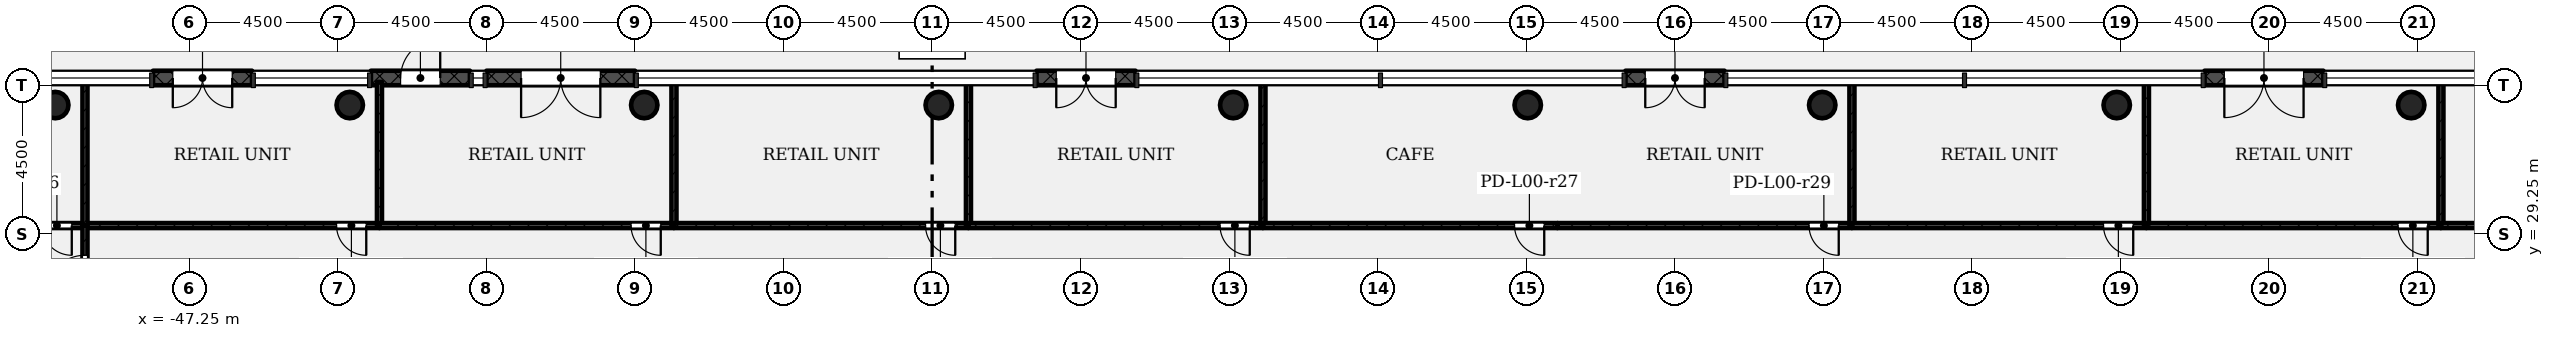
"""IFC4 building model, lengths in metres.
Left out: names, types, materials, properties, quantities, classifications, styles, units other than length and angle.
Written with IfcOpenShell. Run it as: python <this file> out.ifc"""

import sys

from ifc_helpers import new_model, si_unit, direction, frame, frame_2d, origin, origin_2d, place, context, subcontext, project, spatial, rectangle, hollow_circle, extrude, element, fill, save


model = new_model("IFC4")
c1 = context("Model", 3, precision=1e-05, world=origin(), true_north=direction((0.0, 1.0)))
c2 = subcontext(c1, "Body", "Model", "MODEL_VIEW")
j1 = project(units=[si_unit("LENGTHUNIT", "METRE"), si_unit("PLANEANGLEUNIT", "RADIAN")], contexts=[c1])
p1 = place(None, origin())
s1 = spatial("IfcSite", under=j1, at=p1, CompositionType="ELEMENT")
p2 = place(p1, origin())
s2 = spatial("IfcBuilding", under=s1, at=p2, CompositionType="ELEMENT")
p3 = place(p2, origin())
s3 = spatial("IfcBuildingStorey", under=s2, at=p3, CompositionType="ELEMENT", Elevation=0.0)
for number, where, z_axis, x_axis in (
    (1, (-51.31, 33.15, -0.4), (0.0, 0.0, 1.0), (1.0, 0.0, 0.0)),
    (2, (-42.39, 33.15, -0.4), (0.0, 0.0, 1.0), (1.0, 0.0, 0.0)),
    (3, (-33.47, 33.15, -0.4), (0.0, 0.0, 1.0), (1.0, 0.0, 0.0)),
    (4, (-24.55, 33.15, -0.4), (0.0, 0.0, 1.0), (1.0, 0.0, 0.0)),
    (5, (-15.63, 33.15, -0.4), (0.0, 0.0, 1.0), (1.0, 0.0, 0.0)),
    (6, (-6.71, 33.15, -0.4), (0.0, 0.0, 1.0), (1.0, 0.0, 0.0)),
    (7, (2.21, 33.15, -0.4), (0.0, 0.0, 1.0), (1.0, 0.0, 0.0)),
    (8, (11.13, 33.15, -0.4), (0.0, 0.0, 1.0), (1.0, 0.0, 0.0)),
    (9, (20.05, 33.15, -0.4), (0.0, 0.0, 1.0), (1.0, 0.0, 0.0)),
):
    element("IfcColumn", number, at=place(p3, frame(where, z_axis=z_axis, x_axis=x_axis)), inside=s3, PredefinedType="COLUMN", context=c2, shape_type="SweptSolid", body=[
        extrude(hollow_circle(Radius=0.4, WallThickness=0.028, at=origin_2d()), origin(), (0.0, 0.0, 1.0), 6.4),
    ])
p4 = place(p3, frame((17.39, 33.97, 0.0), z_axis=(0.0, 0.0, 1.0), x_axis=(-1.0, 0.0, 0.0)))
e10 = element("IfcWall", 10, at=p4, inside=s3, PredefinedType="STANDARD", context=c2, shape_type="SweptSolid", body=[
    extrude(rectangle(XDim=3.6, YDim=0.44, at=frame_2d((1.8, 0.0))), origin(), (0.0, 0.0, 1.0), 5.7),
])
p5 = place(p4, frame((0.6, 0.0, 0.0)))
e11 = element("IfcOpeningElement", 11, at=p5, cuts=e10, PredefinedType="OPENING", context=c2, shape_type="SweptSolid", body=[
    extrude(rectangle(XDim=2.4, YDim=2.4, at=frame_2d((1.2, 1.2))), frame((0.0, 0.23, 0.0), z_axis=(0.0, -1.0, 0.0), x_axis=(1.0, 0.0, 0.0)), (0.0, 0.0, 1.0), 0.46),
])
p6 = place(p3, frame((-0.75, 33.97, 0.0), z_axis=(0.0, 0.0, 1.0), x_axis=(-1.0, 0.0, 0.0)))
e12 = element("IfcWall", 12, at=p6, inside=s3, PredefinedType="STANDARD", context=c2, shape_type="SweptSolid", body=[
    extrude(rectangle(XDim=3.0, YDim=0.44, at=frame_2d((1.5, 0.0))), origin(), (0.0, 0.0, 1.0), 5.7),
])
p7 = place(p6, frame((0.6, 0.0, 0.0)))
e13 = element("IfcOpeningElement", 13, at=p7, cuts=e12, PredefinedType="OPENING", context=c2, shape_type="SweptSolid", body=[
    extrude(rectangle(XDim=1.8, YDim=2.1, at=frame_2d((0.9, 1.05))), frame((0.0, 0.23, 0.0), z_axis=(0.0, -1.0, 0.0), x_axis=(1.0, 0.0, 0.0)), (0.0, 0.0, 1.0), 0.46),
])
p8 = place(p3, frame((-18.59, 33.97, 0.0), z_axis=(0.0, 0.0, 1.0), x_axis=(-1.0, 0.0, 0.0)))
e14 = element("IfcWall", 14, at=p8, inside=s3, PredefinedType="STANDARD", context=c2, shape_type="SweptSolid", body=[
    extrude(rectangle(XDim=3.0, YDim=0.44, at=frame_2d((1.5, 0.0))), origin(), (0.0, 0.0, 1.0), 5.7),
])
p9 = place(p8, frame((0.6, 0.0, 0.0)))
e15 = element("IfcOpeningElement", 15, at=p9, cuts=e14, PredefinedType="OPENING", context=c2, shape_type="SweptSolid", body=[
    extrude(rectangle(XDim=1.8, YDim=2.1, at=frame_2d((0.9, 1.05))), frame((0.0, 0.23, 0.0), z_axis=(0.0, -1.0, 0.0), x_axis=(1.0, 0.0, 0.0)), (0.0, 0.0, 1.0), 0.46),
])
p10 = place(p3, frame((-33.75, 33.97, 0.0), z_axis=(0.0, 0.0, 1.0), x_axis=(-1.0, 0.0, 0.0)))
e16 = element("IfcWall", 16, at=p10, inside=s3, PredefinedType="STANDARD", context=c2, shape_type="SweptSolid", body=[
    extrude(rectangle(XDim=4.5, YDim=0.44, at=frame_2d((2.25, 0.0))), origin(), (0.0, 0.0, 1.0), 5.7),
])
p11 = place(p10, frame((1.05, 0.0, 0.0)))
e17 = element("IfcOpeningElement", 17, at=p11, cuts=e16, PredefinedType="OPENING", context=c2, shape_type="SweptSolid", body=[
    extrude(rectangle(XDim=2.4, YDim=2.1, at=frame_2d((1.2, 1.05))), frame((0.0, 0.23, 0.0), z_axis=(0.0, -1.0, 0.0), x_axis=(1.0, 0.0, 0.0)), (0.0, 0.0, 1.0), 0.46),
])
p12 = place(p3, frame((-38.75, 33.97, 0.0), z_axis=(0.0, 0.0, 1.0), x_axis=(-1.0, 0.0, 0.0)))
e18 = element("IfcWall", 18, at=p12, inside=s3, PredefinedType="STANDARD", context=c2, shape_type="SweptSolid", body=[
    extrude(rectangle(XDim=3.0, YDim=0.44, at=frame_2d((1.5, 0.0))), origin(), (0.0, 0.0, 1.0), 5.7),
])
p13 = place(p12, frame((0.9, 0.0, 0.0)))
e19 = element("IfcOpeningElement", 19, at=p13, cuts=e18, PredefinedType="OPENING", context=c2, shape_type="SweptSolid", body=[
    extrude(rectangle(XDim=1.2, YDim=2.1, at=frame_2d((0.6, 1.05))), frame((0.0, 0.23, 0.0), z_axis=(0.0, -1.0, 0.0), x_axis=(1.0, 0.0, 0.0)), (0.0, 0.0, 1.0), 0.46),
])
p14 = place(p3, frame((-45.35, 33.97, 0.0), z_axis=(0.0, 0.0, 1.0), x_axis=(-1.0, 0.0, 0.0)))
e20 = element("IfcWall", 20, at=p14, inside=s3, PredefinedType="STANDARD", context=c2, shape_type="SweptSolid", body=[
    extrude(rectangle(XDim=3.0, YDim=0.44, at=frame_2d((1.5, 0.0))), origin(), (0.0, 0.0, 1.0), 5.7),
])
p15 = place(p14, frame((0.6, 0.0, 0.0)))
e21 = element("IfcOpeningElement", 21, at=p15, cuts=e20, PredefinedType="OPENING", context=c2, shape_type="SweptSolid", body=[
    extrude(rectangle(XDim=1.8, YDim=2.1, at=frame_2d((0.9, 1.05))), frame((0.0, 0.23, 0.0), z_axis=(0.0, -1.0, 0.0), x_axis=(1.0, 0.0, 0.0)), (0.0, 0.0, 1.0), 0.46),
])
p16 = place(p3, frame((-50.41, 29.5, 0.0), z_axis=(0.0, 0.0, 1.0), x_axis=(-1.0, 0.0, 0.0)))
e22 = element("IfcWall", 22, at=p16, inside=s3, PredefinedType="PARTITIONING", context=c2, shape_type="SweptSolid", body=[
    extrude(rectangle(XDim=8.92, YDim=0.15, at=frame_2d((4.46, 0.0))), origin(), (0.0, 0.0, 1.0), 5.58),
])
p17 = place(p16, frame((0.4, 0.0, 0.0)))
e23 = element("IfcOpeningElement", 23, at=p17, cuts=e22, PredefinedType="OPENING", context=c2, shape_type="SweptSolid", body=[
    extrude(rectangle(XDim=0.9, YDim=2.1, at=frame_2d((0.45, 1.05))), frame((0.0, 0.085, 0.0), z_axis=(0.0, -1.0, 0.0), x_axis=(1.0, 0.0, 0.0)), (0.0, 0.0, 1.0), 0.17),
])
p18 = place(p3, frame((-41.49, 29.5, 0.0), z_axis=(0.0, 0.0, 1.0), x_axis=(-1.0, 0.0, 0.0)))
e24 = element("IfcWall", 24, at=p18, inside=s3, PredefinedType="PARTITIONING", context=c2, shape_type="SweptSolid", body=[
    extrude(rectangle(XDim=8.92, YDim=0.15, at=frame_2d((4.46, 0.0))), origin(), (0.0, 0.0, 1.0), 5.58),
])
p19 = place(p18, frame((0.4, 0.0, 0.0)))
e25 = element("IfcOpeningElement", 25, at=p19, cuts=e24, PredefinedType="OPENING", context=c2, shape_type="SweptSolid", body=[
    extrude(rectangle(XDim=0.9, YDim=2.1, at=frame_2d((0.45, 1.05))), frame((0.0, 0.085, 0.0), z_axis=(0.0, -1.0, 0.0), x_axis=(1.0, 0.0, 0.0)), (0.0, 0.0, 1.0), 0.17),
])
for number, where, z_axis, x_axis in (
    (26, (-50.41, 29.5, 0.0), (0.0, 0.0, 1.0), (0.0, 1.0, 0.0)),
    (27, (-41.49, 33.85, 0.0), (0.0, 0.0, 1.0), (0.0, -1.0, 0.0)),
):
    element("IfcWall", number, at=place(p3, frame(where, z_axis=z_axis, x_axis=x_axis)), inside=s3, PredefinedType="PARTITIONING", context=c2, shape_type="SweptSolid", body=[
        extrude(rectangle(XDim=4.35, YDim=0.15, at=frame_2d((2.175, 0.0))), origin(), (0.0, 0.0, 1.0), 5.58),
    ])
p20 = place(p3, frame((-32.57, 29.5, 0.0), z_axis=(0.0, 0.0, 1.0), x_axis=(-1.0, 0.0, 0.0)))
e28 = element("IfcWall", 28, at=p20, inside=s3, PredefinedType="PARTITIONING", context=c2, shape_type="SweptSolid", body=[
    extrude(rectangle(XDim=8.92, YDim=0.15, at=frame_2d((4.46, 0.0))), origin(), (0.0, 0.0, 1.0), 5.58),
])
p21 = place(p20, frame((0.4, 0.0, 0.0)))
e29 = element("IfcOpeningElement", 29, at=p21, cuts=e28, PredefinedType="OPENING", context=c2, shape_type="SweptSolid", body=[
    extrude(rectangle(XDim=0.9, YDim=2.1, at=frame_2d((0.45, 1.05))), frame((0.0, 0.085, 0.0), z_axis=(0.0, -1.0, 0.0), x_axis=(1.0, 0.0, 0.0)), (0.0, 0.0, 1.0), 0.17),
])
p22 = place(p3, frame((-32.57, 33.85, 0.0), z_axis=(0.0, 0.0, 1.0), x_axis=(0.0, -1.0, 0.0)))
e30 = element("IfcWall", 30, at=p22, inside=s3, PredefinedType="PARTITIONING", context=c2, shape_type="SweptSolid", body=[
    extrude(rectangle(XDim=4.35, YDim=0.15, at=frame_2d((2.175, 0.0))), origin(), (0.0, 0.0, 1.0), 5.58),
])
p23 = place(p3, frame((-23.65, 29.5, 0.0), z_axis=(0.0, 0.0, 1.0), x_axis=(-1.0, 0.0, 0.0)))
e31 = element("IfcWall", 31, at=p23, inside=s3, PredefinedType="PARTITIONING", context=c2, shape_type="SweptSolid", body=[
    extrude(rectangle(XDim=8.92, YDim=0.15, at=frame_2d((4.46, 0.0))), origin(), (0.0, 0.0, 1.0), 5.58),
])
p24 = place(p23, frame((0.4, 0.0, 0.0)))
e32 = element("IfcOpeningElement", 32, at=p24, cuts=e31, PredefinedType="OPENING", context=c2, shape_type="SweptSolid", body=[
    extrude(rectangle(XDim=0.9, YDim=2.1, at=frame_2d((0.45, 1.05))), frame((0.0, 0.085, 0.0), z_axis=(0.0, -1.0, 0.0), x_axis=(1.0, 0.0, 0.0)), (0.0, 0.0, 1.0), 0.17),
])
p25 = place(p3, frame((-23.65, 33.85, 0.0), z_axis=(0.0, 0.0, 1.0), x_axis=(0.0, -1.0, 0.0)))
e33 = element("IfcWall", 33, at=p25, inside=s3, PredefinedType="PARTITIONING", context=c2, shape_type="SweptSolid", body=[
    extrude(rectangle(XDim=4.35, YDim=0.15, at=frame_2d((2.175, 0.0))), origin(), (0.0, 0.0, 1.0), 5.58),
])
p26 = place(p3, frame((-14.73, 29.5, 0.0), z_axis=(0.0, 0.0, 1.0), x_axis=(-1.0, 0.0, 0.0)))
e34 = element("IfcWall", 34, at=p26, inside=s3, PredefinedType="PARTITIONING", context=c2, shape_type="SweptSolid", body=[
    extrude(rectangle(XDim=8.92, YDim=0.15, at=frame_2d((4.46, 0.0))), origin(), (0.0, 0.0, 1.0), 5.58),
])
p27 = place(p26, frame((0.4, 0.0, 0.0)))
e35 = element("IfcOpeningElement", 35, at=p27, cuts=e34, PredefinedType="OPENING", context=c2, shape_type="SweptSolid", body=[
    extrude(rectangle(XDim=0.9, YDim=2.1, at=frame_2d((0.45, 1.05))), frame((0.0, 0.085, 0.0), z_axis=(0.0, -1.0, 0.0), x_axis=(1.0, 0.0, 0.0)), (0.0, 0.0, 1.0), 0.17),
])
p28 = place(p3, frame((-14.73, 33.85, 0.0), z_axis=(0.0, 0.0, 1.0), x_axis=(0.0, -1.0, 0.0)))
e36 = element("IfcWall", 36, at=p28, inside=s3, PredefinedType="PARTITIONING", context=c2, shape_type="SweptSolid", body=[
    extrude(rectangle(XDim=4.35, YDim=0.15, at=frame_2d((2.175, 0.0))), origin(), (0.0, 0.0, 1.0), 5.58),
])
p29 = place(p3, frame((-5.81, 29.5, 0.0), z_axis=(0.0, 0.0, 1.0), x_axis=(-1.0, 0.0, 0.0)))
e37 = element("IfcWall", 37, at=p29, inside=s3, PredefinedType="PARTITIONING", context=c2, shape_type="SweptSolid", body=[
    extrude(rectangle(XDim=8.92, YDim=0.15, at=frame_2d((4.46, 0.0))), origin(), (0.0, 0.0, 1.0), 5.58),
])
p30 = place(p29, frame((0.4, 0.0, 0.0)))
e38 = element("IfcOpeningElement", 38, at=p30, cuts=e37, PredefinedType="OPENING", context=c2, shape_type="SweptSolid", body=[
    extrude(rectangle(XDim=0.9, YDim=2.1, at=frame_2d((0.45, 1.05))), frame((0.0, 0.085, 0.0), z_axis=(0.0, -1.0, 0.0), x_axis=(1.0, 0.0, 0.0)), (0.0, 0.0, 1.0), 0.17),
])
p31 = place(p3, frame((-50.41, 26.5, 0.0), z_axis=(0.0, 0.0, 1.0), x_axis=(0.0, 1.0, 0.0)))
e39 = element("IfcWall", 39, at=p31, inside=s3, PredefinedType="PARTITIONING", context=c2, shape_type="SweptSolid", body=[
    extrude(rectangle(XDim=3.0, YDim=0.15, at=frame_2d((1.5, 0.0))), origin(), (0.0, 0.0, 1.0), 5.58),
])
p32 = place(p31, frame((0.9, 0.0, 0.0)))
e40 = element("IfcOpeningElement", 40, at=p32, cuts=e39, PredefinedType="OPENING", context=c2, shape_type="SweptSolid", body=[
    extrude(rectangle(XDim=1.2, YDim=2.1, at=frame_2d((0.6, 1.05))), frame((0.0, 0.085, 0.0), z_axis=(0.0, -1.0, 0.0), x_axis=(1.0, 0.0, 0.0)), (0.0, 0.0, 1.0), 0.17),
])
p33 = place(p3, frame((3.11, 29.5, 0.0), z_axis=(0.0, 0.0, 1.0), x_axis=(-1.0, 0.0, 0.0)))
e41 = element("IfcWall", 41, at=p33, inside=s3, PredefinedType="PARTITIONING", context=c2, shape_type="SweptSolid", body=[
    extrude(rectangle(XDim=8.92, YDim=0.15, at=frame_2d((4.46, 0.0))), origin(), (0.0, 0.0, 1.0), 5.58),
])
p34 = place(p33, frame((0.4, 0.0, 0.0)))
e42 = element("IfcOpeningElement", 42, at=p34, cuts=e41, PredefinedType="OPENING", context=c2, shape_type="SweptSolid", body=[
    extrude(rectangle(XDim=0.9, YDim=2.1, at=frame_2d((0.45, 1.05))), frame((0.0, 0.085, 0.0), z_axis=(0.0, -1.0, 0.0), x_axis=(1.0, 0.0, 0.0)), (0.0, 0.0, 1.0), 0.17),
])
p35 = place(p3, frame((3.11, 33.85, 0.0), z_axis=(0.0, 0.0, 1.0), x_axis=(0.0, -1.0, 0.0)))
e43 = element("IfcWall", 43, at=p35, inside=s3, PredefinedType="PARTITIONING", context=c2, shape_type="SweptSolid", body=[
    extrude(rectangle(XDim=4.35, YDim=0.15, at=frame_2d((2.175, 0.0))), origin(), (0.0, 0.0, 1.0), 5.58),
])
p36 = place(p3, frame((12.03, 29.5, 0.0), z_axis=(0.0, 0.0, 1.0), x_axis=(-1.0, 0.0, 0.0)))
e44 = element("IfcWall", 44, at=p36, inside=s3, PredefinedType="PARTITIONING", context=c2, shape_type="SweptSolid", body=[
    extrude(rectangle(XDim=8.92, YDim=0.15, at=frame_2d((4.46, 0.0))), origin(), (0.0, 0.0, 1.0), 5.58),
])
p37 = place(p36, frame((0.4, 0.0, 0.0)))
e45 = element("IfcOpeningElement", 45, at=p37, cuts=e44, PredefinedType="OPENING", context=c2, shape_type="SweptSolid", body=[
    extrude(rectangle(XDim=0.9, YDim=2.1, at=frame_2d((0.45, 1.05))), frame((0.0, 0.085, 0.0), z_axis=(0.0, -1.0, 0.0), x_axis=(1.0, 0.0, 0.0)), (0.0, 0.0, 1.0), 0.17),
])
p38 = place(p3, frame((12.03, 33.85, 0.0), z_axis=(0.0, 0.0, 1.0), x_axis=(0.0, -1.0, 0.0)))
e46 = element("IfcWall", 46, at=p38, inside=s3, PredefinedType="PARTITIONING", context=c2, shape_type="SweptSolid", body=[
    extrude(rectangle(XDim=4.35, YDim=0.15, at=frame_2d((2.175, 0.0))), origin(), (0.0, 0.0, 1.0), 5.58),
])
p39 = place(p3, frame((20.95, 29.5, 0.0), z_axis=(0.0, 0.0, 1.0), x_axis=(-1.0, 0.0, 0.0)))
e47 = element("IfcWall", 47, at=p39, inside=s3, PredefinedType="PARTITIONING", context=c2, shape_type="SweptSolid", body=[
    extrude(rectangle(XDim=8.92, YDim=0.15, at=frame_2d((4.46, 0.0))), origin(), (0.0, 0.0, 1.0), 5.58),
])
p40 = place(p39, frame((0.4, 0.0, 0.0)))
e48 = element("IfcOpeningElement", 48, at=p40, cuts=e47, PredefinedType="OPENING", context=c2, shape_type="SweptSolid", body=[
    extrude(rectangle(XDim=0.9, YDim=2.1, at=frame_2d((0.45, 1.05))), frame((0.0, 0.085, 0.0), z_axis=(0.0, -1.0, 0.0), x_axis=(1.0, 0.0, 0.0)), (0.0, 0.0, 1.0), 0.17),
])
p41 = place(p3, frame((20.95, 33.85, 0.0), z_axis=(0.0, 0.0, 1.0), x_axis=(0.0, -1.0, 0.0)))
e49 = element("IfcWall", 49, at=p41, inside=s3, PredefinedType="PARTITIONING", context=c2, shape_type="SweptSolid", body=[
    extrude(rectangle(XDim=4.35, YDim=0.15, at=frame_2d((2.175, 0.0))), origin(), (0.0, 0.0, 1.0), 5.58),
])
p42 = place(p3, frame((29.87, 29.5, 0.0), z_axis=(0.0, 0.0, 1.0), x_axis=(-1.0, 0.0, 0.0)))
e50 = element("IfcWall", 50, at=p42, inside=s3, PredefinedType="PARTITIONING", context=c2, shape_type="SweptSolid", body=[
    extrude(rectangle(XDim=8.92, YDim=0.15, at=frame_2d((4.46, 0.0))), origin(), (0.0, 0.0, 1.0), 5.58),
])
p43 = place(p42, frame((0.4, 0.0, 0.0)))
e51 = element("IfcOpeningElement", 51, at=p43, cuts=e50, PredefinedType="OPENING", context=c2, shape_type="SweptSolid", body=[
    extrude(rectangle(XDim=0.9, YDim=2.1, at=frame_2d((0.45, 1.05))), frame((0.0, 0.085, 0.0), z_axis=(0.0, -1.0, 0.0), x_axis=(1.0, 0.0, 0.0)), (0.0, 0.0, 1.0), 0.17),
])
p44 = place(p5, origin())
e52 = element("IfcDoor", 52, at=p44, inside=s3, OperationType="DOUBLE_DOOR_DOUBLE_SWING", PredefinedType="DOOR", context=c2, shape_type="SweptSolid", body=[
    extrude(rectangle(XDim=2.4, YDim=2.4, at=frame_2d((1.2, 1.2))), frame((0.0, 0.025, 0.0), z_axis=(0.0, -1.0, 0.0), x_axis=(1.0, 0.0, 0.0)), (0.0, 0.0, 1.0), 0.05),
])
fill(e11, e52)
p45 = place(p7, origin())
e53 = element("IfcDoor", 53, at=p45, inside=s3, OperationType="DOUBLE_DOOR_DOUBLE_SWING", PredefinedType="DOOR", context=c2, shape_type="SweptSolid", body=[
    extrude(rectangle(XDim=1.8, YDim=2.1, at=frame_2d((0.9, 1.05))), frame((0.0, 0.025, 0.0), z_axis=(0.0, -1.0, 0.0), x_axis=(1.0, 0.0, 0.0)), (0.0, 0.0, 1.0), 0.05),
])
fill(e13, e53)
p46 = place(p9, origin())
e54 = element("IfcDoor", 54, at=p46, inside=s3, OperationType="DOUBLE_DOOR_DOUBLE_SWING", PredefinedType="DOOR", context=c2, shape_type="SweptSolid", body=[
    extrude(rectangle(XDim=1.8, YDim=2.1, at=frame_2d((0.9, 1.05))), frame((0.0, 0.025, 0.0), z_axis=(0.0, -1.0, 0.0), x_axis=(1.0, 0.0, 0.0)), (0.0, 0.0, 1.0), 0.05),
])
fill(e15, e54)
p47 = place(p11, origin())
e55 = element("IfcDoor", 55, at=p47, inside=s3, OperationType="DOUBLE_DOOR_DOUBLE_SWING", PredefinedType="DOOR", context=c2, shape_type="SweptSolid", body=[
    extrude(rectangle(XDim=2.4, YDim=2.1, at=frame_2d((1.2, 1.05))), frame((0.0, 0.025, 0.0), z_axis=(0.0, -1.0, 0.0), x_axis=(1.0, 0.0, 0.0)), (0.0, 0.0, 1.0), 0.05),
])
fill(e17, e55)
p48 = place(p13, origin())
e56 = element("IfcDoor", 56, at=p48, inside=s3, OperationType="SINGLE_SWING_LEFT", PredefinedType="DOOR", context=c2, shape_type="SweptSolid", body=[
    extrude(rectangle(XDim=1.2, YDim=2.1, at=frame_2d((0.6, 1.05))), frame((0.0, 0.025, 0.0), z_axis=(0.0, -1.0, 0.0), x_axis=(1.0, 0.0, 0.0)), (0.0, 0.0, 1.0), 0.05),
])
fill(e19, e56)
p49 = place(p15, origin())
e57 = element("IfcDoor", 57, at=p49, inside=s3, OperationType="DOUBLE_DOOR_DOUBLE_SWING", PredefinedType="DOOR", context=c2, shape_type="SweptSolid", body=[
    extrude(rectangle(XDim=1.8, YDim=2.1, at=frame_2d((0.9, 1.05))), frame((0.0, 0.025, 0.0), z_axis=(0.0, -1.0, 0.0), x_axis=(1.0, 0.0, 0.0)), (0.0, 0.0, 1.0), 0.05),
])
fill(e21, e57)
p50 = place(p17, origin())
e58 = element("IfcDoor", 58, at=p50, inside=s3, OperationType="SINGLE_SWING_RIGHT", PredefinedType="DOOR", context=c2, shape_type="SweptSolid", body=[
    extrude(rectangle(XDim=0.9, YDim=2.1, at=frame_2d((0.45, 1.05))), frame((0.0, 0.025, 0.0), z_axis=(0.0, -1.0, 0.0), x_axis=(1.0, 0.0, 0.0)), (0.0, 0.0, 1.0), 0.05),
])
fill(e23, e58)
p51 = place(p19, origin())
e59 = element("IfcDoor", 59, at=p51, inside=s3, OperationType="SINGLE_SWING_RIGHT", PredefinedType="DOOR", context=c2, shape_type="SweptSolid", body=[
    extrude(rectangle(XDim=0.9, YDim=2.1, at=frame_2d((0.45, 1.05))), frame((0.0, 0.025, 0.0), z_axis=(0.0, -1.0, 0.0), x_axis=(1.0, 0.0, 0.0)), (0.0, 0.0, 1.0), 0.05),
])
fill(e25, e59)
p52 = place(p21, origin())
e60 = element("IfcDoor", 60, at=p52, inside=s3, OperationType="SINGLE_SWING_RIGHT", PredefinedType="DOOR", context=c2, shape_type="SweptSolid", body=[
    extrude(rectangle(XDim=0.9, YDim=2.1, at=frame_2d((0.45, 1.05))), frame((0.0, 0.025, 0.0), z_axis=(0.0, -1.0, 0.0), x_axis=(1.0, 0.0, 0.0)), (0.0, 0.0, 1.0), 0.05),
])
fill(e29, e60)
p53 = place(p24, origin())
e61 = element("IfcDoor", 61, at=p53, inside=s3, OperationType="SINGLE_SWING_RIGHT", PredefinedType="DOOR", context=c2, shape_type="SweptSolid", body=[
    extrude(rectangle(XDim=0.9, YDim=2.1, at=frame_2d((0.45, 1.05))), frame((0.0, 0.025, 0.0), z_axis=(0.0, -1.0, 0.0), x_axis=(1.0, 0.0, 0.0)), (0.0, 0.0, 1.0), 0.05),
])
fill(e32, e61)
p54 = place(p27, origin())
e62 = element("IfcDoor", 62, at=p54, inside=s3, OperationType="SINGLE_SWING_RIGHT", PredefinedType="DOOR", context=c2, shape_type="SweptSolid", body=[
    extrude(rectangle(XDim=0.9, YDim=2.1, at=frame_2d((0.45, 1.05))), frame((0.0, 0.025, 0.0), z_axis=(0.0, -1.0, 0.0), x_axis=(1.0, 0.0, 0.0)), (0.0, 0.0, 1.0), 0.05),
])
fill(e35, e62)
p55 = place(p30, origin())
e63 = element("IfcDoor", 63, at=p55, inside=s3, OperationType="SINGLE_SWING_RIGHT", PredefinedType="DOOR", context=c2, shape_type="SweptSolid", body=[
    extrude(rectangle(XDim=0.9, YDim=2.1, at=frame_2d((0.45, 1.05))), frame((0.0, 0.025, 0.0), z_axis=(0.0, -1.0, 0.0), x_axis=(1.0, 0.0, 0.0)), (0.0, 0.0, 1.0), 0.05),
])
fill(e38, e63)
p56 = place(p32, origin())
e64 = element("IfcDoor", 64, at=p56, inside=s3, OperationType="SINGLE_SWING_RIGHT", PredefinedType="DOOR", context=c2, shape_type="SweptSolid", body=[
    extrude(rectangle(XDim=1.2, YDim=2.1, at=frame_2d((0.6, 1.05))), frame((0.0, 0.025, 0.0), z_axis=(0.0, -1.0, 0.0), x_axis=(1.0, 0.0, 0.0)), (0.0, 0.0, 1.0), 0.05),
])
fill(e40, e64)
p57 = place(p34, origin())
e65 = element("IfcDoor", 65, at=p57, inside=s3, OperationType="SINGLE_SWING_RIGHT", PredefinedType="DOOR", context=c2, shape_type="SweptSolid", body=[
    extrude(rectangle(XDim=0.9, YDim=2.1, at=frame_2d((0.45, 1.05))), frame((0.0, 0.025, 0.0), z_axis=(0.0, -1.0, 0.0), x_axis=(1.0, 0.0, 0.0)), (0.0, 0.0, 1.0), 0.05),
])
fill(e42, e65)
p58 = place(p37, origin())
e66 = element("IfcDoor", 66, at=p58, inside=s3, OperationType="SINGLE_SWING_RIGHT", PredefinedType="DOOR", context=c2, shape_type="SweptSolid", body=[
    extrude(rectangle(XDim=0.9, YDim=2.1, at=frame_2d((0.45, 1.05))), frame((0.0, 0.025, 0.0), z_axis=(0.0, -1.0, 0.0), x_axis=(1.0, 0.0, 0.0)), (0.0, 0.0, 1.0), 0.05),
])
fill(e45, e66)
p59 = place(p40, origin())
e67 = element("IfcDoor", 67, at=p59, inside=s3, OperationType="SINGLE_SWING_RIGHT", PredefinedType="DOOR", context=c2, shape_type="SweptSolid", body=[
    extrude(rectangle(XDim=0.9, YDim=2.1, at=frame_2d((0.45, 1.05))), frame((0.0, 0.025, 0.0), z_axis=(0.0, -1.0, 0.0), x_axis=(1.0, 0.0, 0.0)), (0.0, 0.0, 1.0), 0.05),
])
fill(e48, e67)
save(model, sys.argv[1])
